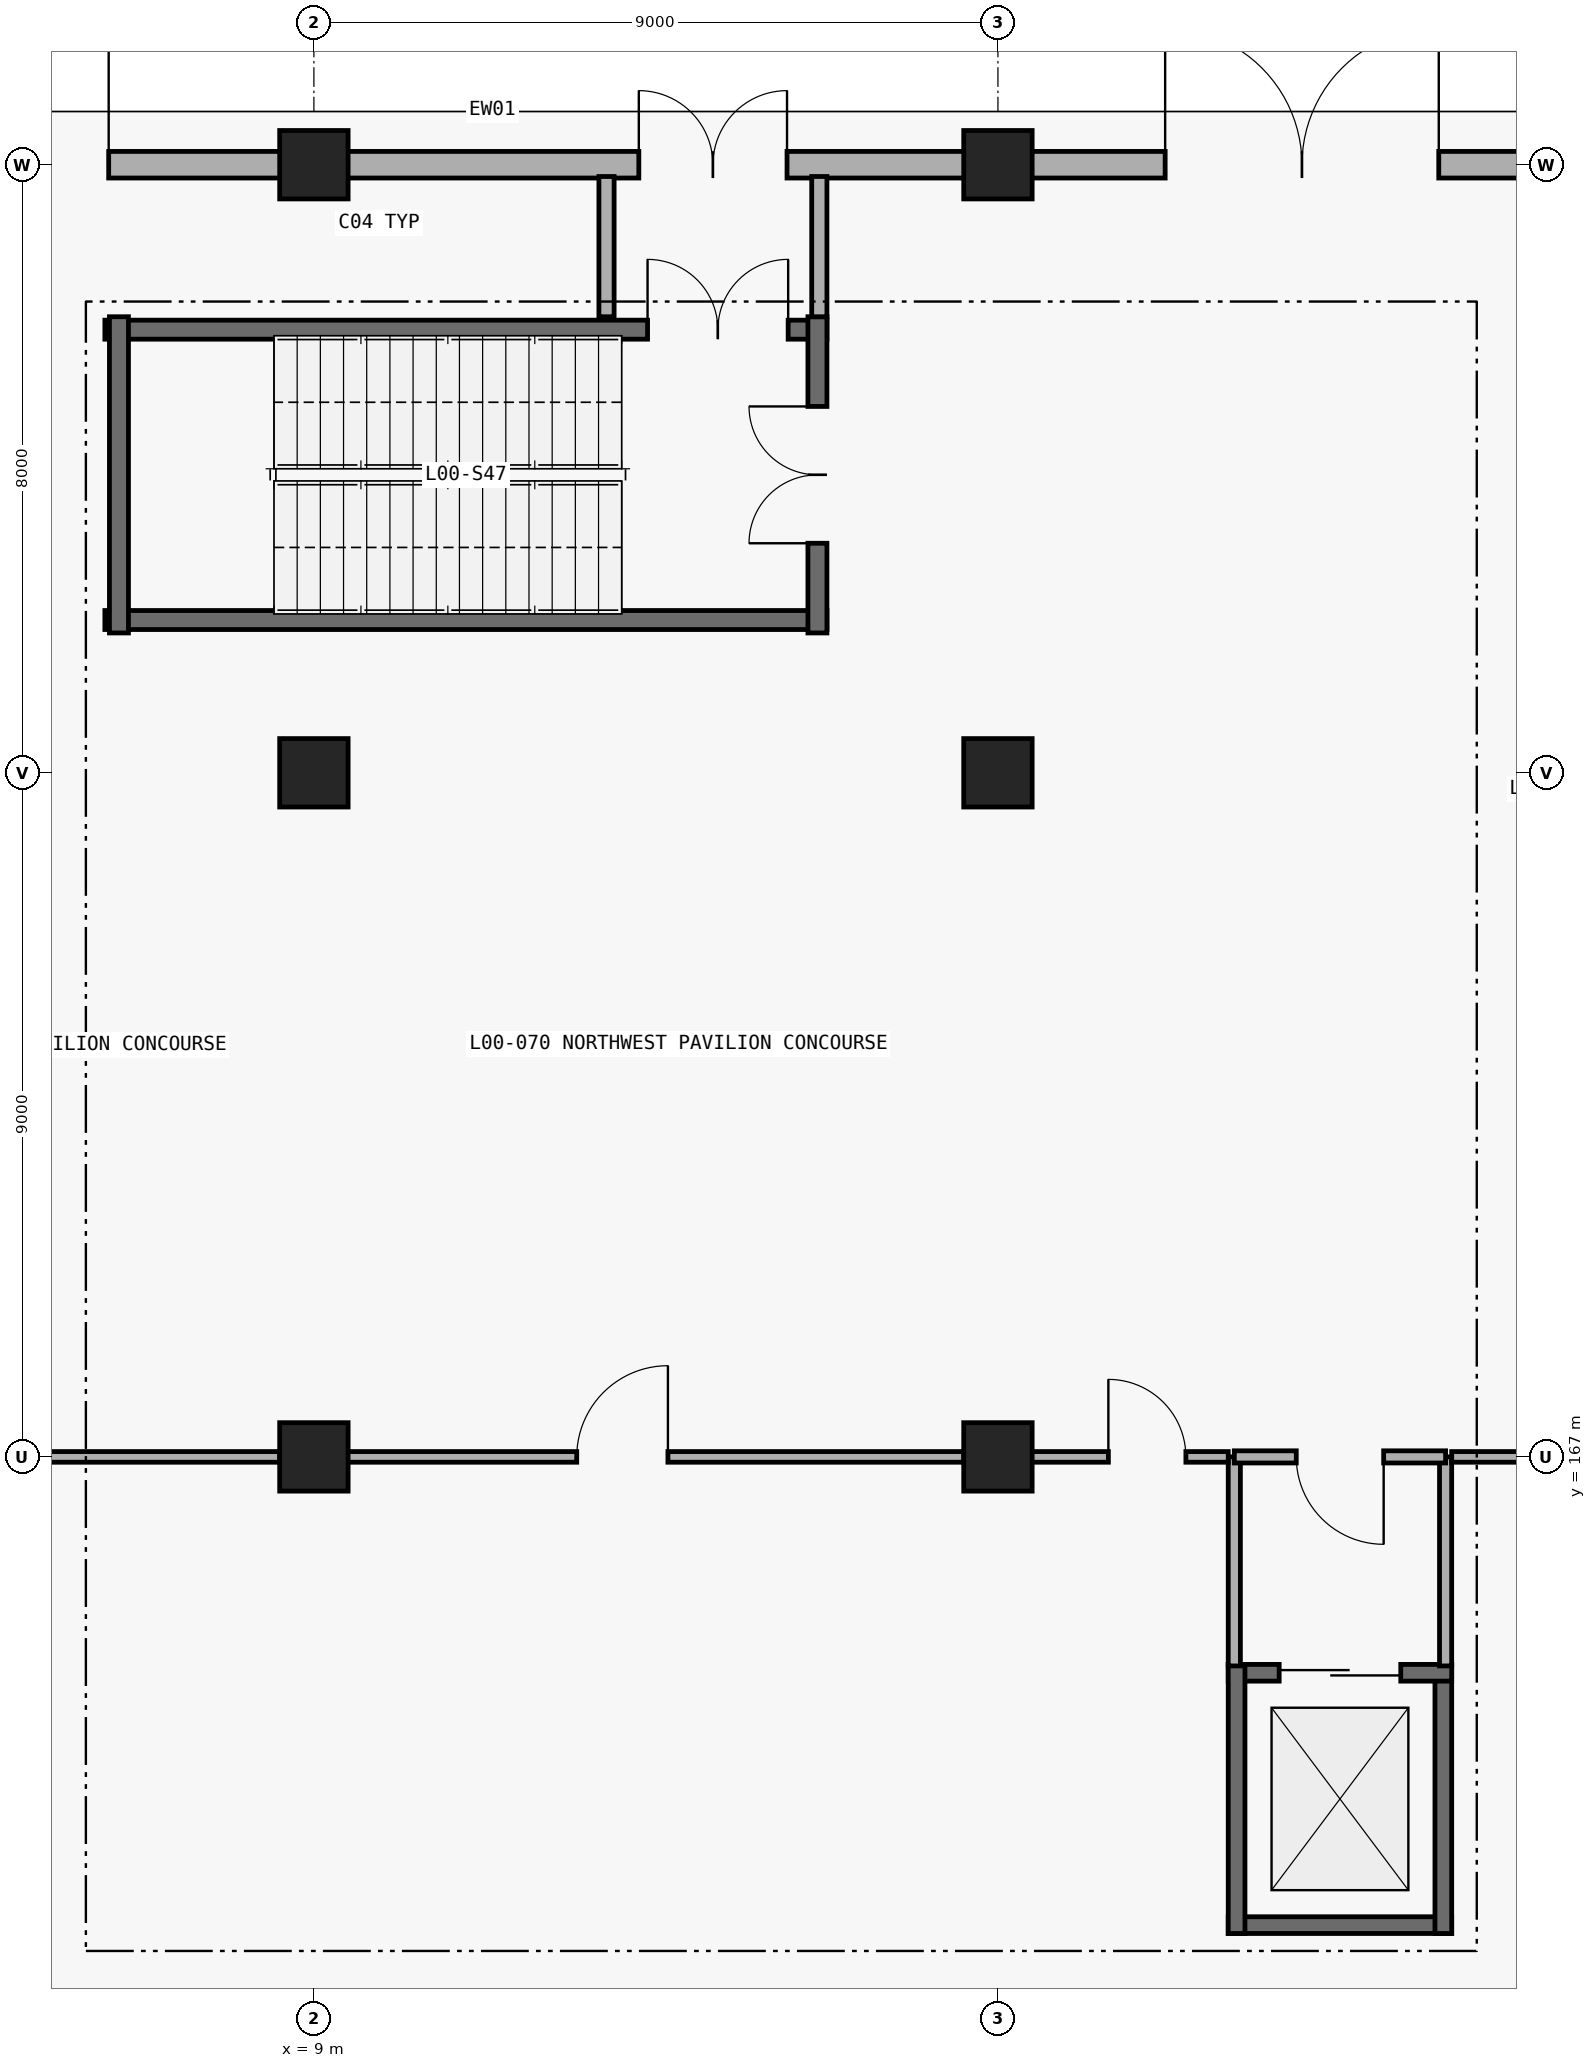
"""IFC4 building model, lengths in metres.
Left out: names, types, materials, properties, quantities, classifications, styles, units other than length and angle.
Written with IfcOpenShell. Run it as: python <this file> out.ifc"""

import sys

from ifc_helpers import new_model, si_unit, direction, frame, frame_2d, origin, origin_2d, place, context, subcontext, project, spatial, rectangle, extrude, element, fill, save


model = new_model("IFC4")
c1 = context("Model", 3, precision=1e-05, world=origin(), true_north=direction((0.0, 1.0)))
c2 = subcontext(c1, "Body", "Model", "MODEL_VIEW")
j1 = project(units=[si_unit("LENGTHUNIT", "METRE"), si_unit("PLANEANGLEUNIT", "RADIAN")], contexts=[c1])
p1 = place(None, origin())
s1 = spatial("IfcSite", under=j1, at=p1, CompositionType="ELEMENT")
p2 = place(p1, origin())
s2 = spatial("IfcBuilding", under=s1, at=p2, CompositionType="ELEMENT")
p3 = place(p2, origin())
s3 = spatial("IfcBuildingStorey", under=s2, at=p3, CompositionType="ELEMENT", Elevation=0.0)
for number, where, z_axis, x_axis in (
    (1, (9.0, 167.0, 0.0), (0.0, 0.0, 1.0), (1.0, 0.0, 0.0)),
    (2, (9.0, 176.0, 0.0), (0.0, 0.0, 1.0), (1.0, 0.0, 0.0)),
    (3, (9.0, 184.0, 0.0), (0.0, 0.0, 1.0), (1.0, 0.0, 0.0)),
    (4, (18.0, 167.0, 0.0), (0.0, 0.0, 1.0), (1.0, 0.0, 0.0)),
    (5, (18.0, 176.0, 0.0), (0.0, 0.0, 1.0), (1.0, 0.0, 0.0)),
    (6, (18.0, 184.0, 0.0), (0.0, 0.0, 1.0), (1.0, 0.0, 0.0)),
):
    element("IfcColumn", number, at=place(p3, frame(where, z_axis=z_axis, x_axis=x_axis)), inside=s3, PredefinedType="COLUMN", context=c2, shape_type="SweptSolid", body=[
        extrude(rectangle(XDim=0.9, YDim=0.9, at=origin_2d()), origin(), (0.0, 0.0, 1.0), 5.4),
    ])
p4 = place(p3, frame((0.425, 184.0, 0.0), z_axis=(0.0, 0.0, 1.0), x_axis=(1.0, 0.0, 0.0)))
e7 = element("IfcWall", 7, at=p4, inside=s3, PredefinedType="STANDARD", context=c2, shape_type="SweptSolid", body=[
    extrude(rectangle(XDim=8.15, YDim=0.35, at=frame_2d((4.075, 0.0))), origin(), (0.0, 0.0, 1.0), 4.384),
])
p5 = place(p4, frame((2.275, 0.0, 0.0)))
e8 = element("IfcOpeningElement", 8, at=p5, cuts=e7, PredefinedType="OPENING", context=c2, shape_type="SweptSolid", body=[
    extrude(rectangle(XDim=3.6, YDim=2.7, at=frame_2d((1.8, 1.35))), frame((0.0, 0.185, 0.0), z_axis=(0.0, -1.0, 0.0), x_axis=(1.0, 0.0, 0.0)), (0.0, 0.0, 1.0), 0.37),
])
p6 = place(p3, frame((9.425, 184.0, 0.0), z_axis=(0.0, 0.0, 1.0), x_axis=(1.0, 0.0, 0.0)))
e9 = element("IfcWall", 9, at=p6, inside=s3, PredefinedType="STANDARD", context=c2, shape_type="SweptSolid", body=[
    extrude(rectangle(XDim=8.15, YDim=0.35, at=frame_2d((4.075, 0.0))), origin(), (0.0, 0.0, 1.0), 4.384),
])
p7 = place(p6, frame((3.85, 0.0, 0.0)))
e10 = element("IfcOpeningElement", 10, at=p7, cuts=e9, PredefinedType="OPENING", context=c2, shape_type="SweptSolid", body=[
    extrude(rectangle(XDim=1.95, YDim=2.25, at=frame_2d((0.975, 1.125))), frame((0.0, 0.185, 0.0), z_axis=(0.0, -1.0, 0.0), x_axis=(1.0, 0.0, 0.0)), (0.0, 0.0, 1.0), 0.37),
])
p8 = place(p3, frame((18.425, 184.0, 0.0), z_axis=(0.0, 0.0, 1.0), x_axis=(1.0, 0.0, 0.0)))
e11 = element("IfcWall", 11, at=p8, inside=s3, PredefinedType="STANDARD", context=c2, shape_type="SweptSolid", body=[
    extrude(rectangle(XDim=8.15, YDim=0.35, at=frame_2d((4.075, 0.0))), origin(), (0.0, 0.0, 1.0), 4.384),
])
p9 = place(p8, frame((1.775, 0.0, 0.0)))
e12 = element("IfcOpeningElement", 12, at=p9, cuts=e11, PredefinedType="OPENING", context=c2, shape_type="SweptSolid", body=[
    extrude(rectangle(XDim=3.6, YDim=2.7, at=frame_2d((1.8, 1.35))), frame((0.0, 0.185, 0.0), z_axis=(0.0, -1.0, 0.0), x_axis=(1.0, 0.0, 0.0)), (0.0, 0.0, 1.0), 0.37),
])
p10 = place(p3, frame((6.25, 181.83, 0.0), z_axis=(0.0, 0.0, 1.0), x_axis=(1.0, 0.0, 0.0)))
e13 = element("IfcWall", 13, at=p10, inside=s3, PredefinedType="SHEAR", context=c2, shape_type="SweptSolid", body=[
    extrude(rectangle(XDim=9.5, YDim=0.25, at=frame_2d((4.75, 0.0))), origin(), (0.0, 0.0, 1.0), 5.1),
])
p11 = place(p10, frame((7.14, 0.0, 0.0)))
e14 = element("IfcOpeningElement", 14, at=p11, cuts=e13, PredefinedType="OPENING", context=c2, shape_type="SweptSolid", body=[
    extrude(rectangle(XDim=1.85, YDim=2.3, at=frame_2d((0.925, 1.15))), frame((0.0, 0.135, 0.0), z_axis=(0.0, -1.0, 0.0), x_axis=(1.0, 0.0, 0.0)), (0.0, 0.0, 1.0), 0.27),
])
p12 = place(p3, frame((6.25, 178.01, 0.0), z_axis=(0.0, 0.0, 1.0), x_axis=(1.0, 0.0, 0.0)))
e15 = element("IfcWall", 15, at=p12, inside=s3, PredefinedType="SHEAR", context=c2, shape_type="SweptSolid", body=[
    extrude(rectangle(XDim=9.5, YDim=0.25, at=frame_2d((4.75, 0.0))), origin(), (0.0, 0.0, 1.0), 5.1),
])
p13 = place(p3, frame((15.625, 177.84, 0.0), z_axis=(0.0, 0.0, 1.0), x_axis=(0.0, 1.0, 0.0)))
e16 = element("IfcWall", 16, at=p13, inside=s3, PredefinedType="SHEAR", context=c2, shape_type="SweptSolid", body=[
    extrude(rectangle(XDim=4.16, YDim=0.25, at=frame_2d((2.08, 0.0))), origin(), (0.0, 0.0, 1.0), 5.1),
])
p14 = place(p13, frame((1.18, 0.0, 0.0)))
e17 = element("IfcOpeningElement", 17, at=p14, cuts=e16, PredefinedType="OPENING", context=c2, shape_type="SweptSolid", body=[
    extrude(rectangle(XDim=1.8, YDim=2.25, at=frame_2d((0.9, 1.125))), frame((0.0, 0.135, 0.0), z_axis=(0.0, -1.0, 0.0), x_axis=(1.0, 0.0, 0.0)), (0.0, 0.0, 1.0), 0.27),
])
p15 = place(p3, frame((6.435, 182.0, 0.0), z_axis=(0.0, 0.0, 1.0), x_axis=(0.0, -1.0, 0.0)))
e18 = element("IfcWall", 18, at=p15, inside=s3, PredefinedType="SHEAR", context=c2, shape_type="SweptSolid", body=[
    extrude(rectangle(XDim=4.16, YDim=0.25, at=frame_2d((2.08, 0.0))), origin(), (0.0, 0.0, 1.0), 5.1),
])
for number, where, z_axis, x_axis in (
    (19, (15.65, 182.0, 0.0), (0.0, 0.0, 1.0), (0.0, 1.0, 0.0)),
    (20, (12.85, 182.0, 0.0), (0.0, 0.0, 1.0), (0.0, 1.0, 0.0)),
):
    element("IfcWall", number, at=place(p3, frame(where, z_axis=z_axis, x_axis=x_axis)), inside=s3, PredefinedType="PARTITIONING", context=c2, shape_type="SweptSolid", body=[
        extrude(rectangle(XDim=1.845, YDim=0.2, at=frame_2d((0.922, 0.0))), origin(), (0.0, 0.0, 1.0), 4.384),
    ])
p16 = place(p3, frame((21.03, 160.84, 0.0), z_axis=(0.0, 0.0, 1.0), x_axis=(1.0, 0.0, 0.0)))
e21 = element("IfcWall", 21, at=p16, inside=s3, PredefinedType="SHEAR", context=c2, shape_type="SweptSolid", body=[
    extrude(rectangle(XDim=2.94, YDim=0.22, at=frame_2d((1.47, 0.0))), origin(), (0.0, 0.0, 1.0), 5.1),
])
p17 = place(p3, frame((23.86, 160.73, 0.0), z_axis=(0.0, 0.0, 1.0), x_axis=(0.0, 1.0, 0.0)))
e22 = element("IfcWall", 22, at=p17, inside=s3, PredefinedType="SHEAR", context=c2, shape_type="SweptSolid", body=[
    extrude(rectangle(XDim=3.54, YDim=0.22, at=frame_2d((1.77, 0.0))), origin(), (0.0, 0.0, 1.0), 5.1),
])
p18 = place(p3, frame((23.97, 164.16, 0.0), z_axis=(0.0, 0.0, 1.0), x_axis=(-1.0, 0.0, 0.0)))
e23 = element("IfcWall", 23, at=p18, inside=s3, PredefinedType="SHEAR", context=c2, shape_type="SweptSolid", body=[
    extrude(rectangle(XDim=2.94, YDim=0.22, at=frame_2d((1.47, 0.0))), origin(), (0.0, 0.0, 1.0), 5.1),
])
p19 = place(p18, frame((0.67, 0.0, 0.0)))
e24 = element("IfcOpeningElement", 24, at=p19, cuts=e23, PredefinedType="OPENING", context=c2, shape_type="SweptSolid", body=[
    extrude(rectangle(XDim=1.6, YDim=2.3, at=frame_2d((0.8, 1.15))), frame((0.0, 0.12, 0.0), z_axis=(0.0, -1.0, 0.0), x_axis=(1.0, 0.0, 0.0)), (0.0, 0.0, 1.0), 0.24),
])
p20 = place(p3, frame((21.14, 164.27, 0.0), z_axis=(0.0, 0.0, 1.0), x_axis=(0.0, -1.0, 0.0)))
e25 = element("IfcWall", 25, at=p20, inside=s3, PredefinedType="SHEAR", context=c2, shape_type="SweptSolid", body=[
    extrude(rectangle(XDim=3.54, YDim=0.22, at=frame_2d((1.77, 0.0))), origin(), (0.0, 0.0, 1.0), 5.1),
])
for number, where, z_axis, x_axis in (
    (26, (23.89, 164.25, 0.0), (0.0, 0.0, 1.0), (0.0, 1.0, 0.0)),
    (27, (21.11, 164.25, 0.0), (0.0, 0.0, 1.0), (0.0, 1.0, 0.0)),
):
    element("IfcWall", number, at=place(p3, frame(where, z_axis=z_axis, x_axis=x_axis)), inside=s3, PredefinedType="PARTITIONING", context=c2, shape_type="SweptSolid", body=[
        extrude(rectangle(XDim=2.75, YDim=0.16, at=frame_2d((1.375, 0.0))), origin(), (0.0, 0.0, 1.0), 4.384),
    ])
p21 = place(p3, frame((23.89, 167.0, 0.0), z_axis=(0.0, 0.0, 1.0), x_axis=(-1.0, 0.0, 0.0)))
e28 = element("IfcWall", 28, at=p21, inside=s3, PredefinedType="PARTITIONING", context=c2, shape_type="SweptSolid", body=[
    extrude(rectangle(XDim=2.78, YDim=0.16, at=frame_2d((1.39, 0.0))), origin(), (0.0, 0.0, 1.0), 4.384),
])
p22 = place(p21, frame((0.815, 0.0, 0.0)))
e29 = element("IfcOpeningElement", 29, at=p22, cuts=e28, PredefinedType="OPENING", context=c2, shape_type="SweptSolid", body=[
    extrude(rectangle(XDim=1.15, YDim=2.2, at=frame_2d((0.575, 1.1))), frame((0.0, 0.09, 0.0), z_axis=(0.0, -1.0, 0.0), x_axis=(1.0, 0.0, 0.0)), (0.0, 0.0, 1.0), 0.18),
])
p23 = place(p3, frame((0.435, 167.0, 0.0), z_axis=(0.0, 0.0, 1.0), x_axis=(1.0, 0.0, 0.0)))
e30 = element("IfcWall", 30, at=p23, inside=s3, PredefinedType="PARTITIONING", context=c2, shape_type="SweptSolid", body=[
    extrude(rectangle(XDim=8.13, YDim=0.14, at=frame_2d((4.065, 0.0))), origin(), (0.0, 0.0, 1.0), 4.384),
])
p24 = place(p23, frame((3.515, 0.0, 0.0)))
e31 = element("IfcOpeningElement", 31, at=p24, cuts=e30, PredefinedType="OPENING", context=c2, shape_type="SweptSolid", body=[
    extrude(rectangle(XDim=1.1, YDim=2.15, at=frame_2d((0.55, 1.075))), frame((0.0, 0.08, 0.0), z_axis=(0.0, -1.0, 0.0), x_axis=(1.0, 0.0, 0.0)), (0.0, 0.0, 1.0), 0.16),
])
p25 = place(p3, frame((8.55, 167.0, 0.0), z_axis=(0.0, 0.0, 1.0), x_axis=(1.0, 0.0, 0.0)))
e32 = element("IfcWall", 32, at=p25, inside=s3, PredefinedType="PARTITIONING", context=c2, shape_type="SweptSolid", body=[
    extrude(rectangle(XDim=9.015, YDim=0.14, at=frame_2d((4.507, 0.0))), origin(), (0.0, 0.0, 1.0), 4.384),
])
p26 = place(p25, frame((3.908, 0.0, 0.0)))
e33 = element("IfcOpeningElement", 33, at=p26, cuts=e32, PredefinedType="OPENING", context=c2, shape_type="SweptSolid", body=[
    extrude(rectangle(XDim=1.2, YDim=2.25, at=frame_2d((0.6, 1.125))), frame((0.0, 0.08, 0.0), z_axis=(0.0, -1.0, 0.0), x_axis=(1.0, 0.0, 0.0)), (0.0, 0.0, 1.0), 0.16),
])
p27 = place(p3, frame((17.55, 167.0, 0.0), z_axis=(0.0, 0.0, 1.0), x_axis=(1.0, 0.0, 0.0)))
e34 = element("IfcWall", 34, at=p27, inside=s3, PredefinedType="PARTITIONING", context=c2, shape_type="SweptSolid", body=[
    extrude(rectangle(XDim=3.48, YDim=0.14, at=frame_2d((1.74, 0.0))), origin(), (0.0, 0.0, 1.0), 4.384),
])
p28 = place(p27, frame((1.903, 0.0, 0.0)))
e35 = element("IfcOpeningElement", 35, at=p28, cuts=e34, PredefinedType="OPENING", context=c2, shape_type="SweptSolid", body=[
    extrude(rectangle(XDim=1.02, YDim=2.2, at=frame_2d((0.51, 1.1))), frame((0.0, 0.08, 0.0), z_axis=(0.0, -1.0, 0.0), x_axis=(1.0, 0.0, 0.0)), (0.0, 0.0, 1.0), 0.16),
])
p29 = place(p3, frame((23.97, 167.0, 0.0), z_axis=(0.0, 0.0, 1.0), x_axis=(1.0, 0.0, 0.0)))
e36 = element("IfcWall", 36, at=p29, inside=s3, PredefinedType="PARTITIONING", context=c2, shape_type="SweptSolid", body=[
    extrude(rectangle(XDim=2.595, YDim=0.14, at=frame_2d((1.297, 0.0))), origin(), (0.0, 0.0, 1.0), 4.384),
])
p30 = place(p5, origin())
e37 = element("IfcDoor", 37, at=p30, inside=s3, OperationType="DOUBLE_DOOR_SINGLE_SWING", PredefinedType="DOOR", context=c2, shape_type="SweptSolid", body=[
    extrude(rectangle(XDim=3.6, YDim=2.7, at=frame_2d((1.8, 1.35))), frame((0.0, 0.025, 0.0), z_axis=(0.0, -1.0, 0.0), x_axis=(1.0, 0.0, 0.0)), (0.0, 0.0, 1.0), 0.05),
])
fill(e8, e37)
p31 = place(p7, origin())
e38 = element("IfcDoor", 38, at=p31, inside=s3, OperationType="DOUBLE_DOOR_SINGLE_SWING", PredefinedType="DOOR", context=c2, shape_type="SweptSolid", body=[
    extrude(rectangle(XDim=1.95, YDim=2.25, at=frame_2d((0.975, 1.125))), frame((0.0, 0.025, 0.0), z_axis=(0.0, -1.0, 0.0), x_axis=(1.0, 0.0, 0.0)), (0.0, 0.0, 1.0), 0.05),
])
fill(e10, e38)
p32 = place(p9, origin())
e39 = element("IfcDoor", 39, at=p32, inside=s3, OperationType="DOUBLE_DOOR_SINGLE_SWING", PredefinedType="DOOR", context=c2, shape_type="SweptSolid", body=[
    extrude(rectangle(XDim=3.6, YDim=2.7, at=frame_2d((1.8, 1.35))), frame((0.0, 0.025, 0.0), z_axis=(0.0, -1.0, 0.0), x_axis=(1.0, 0.0, 0.0)), (0.0, 0.0, 1.0), 0.05),
])
fill(e12, e39)
p33 = place(p14, origin())
e40 = element("IfcDoor", 40, at=p33, inside=s3, OperationType="DOUBLE_DOOR_SINGLE_SWING", PredefinedType="DOOR", context=c2, shape_type="SweptSolid", body=[
    extrude(rectangle(XDim=1.8, YDim=2.25, at=frame_2d((0.9, 1.125))), frame((0.0, 0.025, 0.0), z_axis=(0.0, -1.0, 0.0), x_axis=(1.0, 0.0, 0.0)), (0.0, 0.0, 1.0), 0.05),
])
fill(e17, e40)
p34 = place(p11, origin())
e41 = element("IfcDoor", 41, at=p34, inside=s3, OperationType="DOUBLE_DOOR_SINGLE_SWING", PredefinedType="DOOR", context=c2, shape_type="SweptSolid", body=[
    extrude(rectangle(XDim=1.85, YDim=2.3, at=frame_2d((0.925, 1.15))), frame((0.0, 0.025, 0.0), z_axis=(0.0, -1.0, 0.0), x_axis=(1.0, 0.0, 0.0)), (0.0, 0.0, 1.0), 0.05),
])
fill(e14, e41)
p35 = place(p19, origin())
e42 = element("IfcDoor", 42, at=p35, inside=s3, OperationType="SLIDING_TO_LEFT", PredefinedType="DOOR", context=c2, shape_type="SweptSolid", body=[
    extrude(rectangle(XDim=1.6, YDim=2.3, at=frame_2d((0.8, 1.15))), frame((0.0, 0.025, 0.0), z_axis=(0.0, -1.0, 0.0), x_axis=(1.0, 0.0, 0.0)), (0.0, 0.0, 1.0), 0.05),
])
fill(e24, e42)
p36 = place(p22, origin())
e43 = element("IfcDoor", 43, at=p36, inside=s3, OperationType="SINGLE_SWING_LEFT", PredefinedType="DOOR", context=c2, shape_type="SweptSolid", body=[
    extrude(rectangle(XDim=1.15, YDim=2.2, at=frame_2d((0.575, 1.1))), frame((0.0, 0.025, 0.0), z_axis=(0.0, -1.0, 0.0), x_axis=(1.0, 0.0, 0.0)), (0.0, 0.0, 1.0), 0.05),
])
fill(e29, e43)
p37 = place(p26, origin())
e44 = element("IfcDoor", 44, at=p37, inside=s3, OperationType="SINGLE_SWING_RIGHT", PredefinedType="DOOR", context=c2, shape_type="SweptSolid", body=[
    extrude(rectangle(XDim=1.2, YDim=2.25, at=frame_2d((0.6, 1.125))), frame((0.0, 0.025, 0.0), z_axis=(0.0, -1.0, 0.0), x_axis=(1.0, 0.0, 0.0)), (0.0, 0.0, 1.0), 0.05),
])
fill(e33, e44)
p38 = place(p28, origin())
e45 = element("IfcDoor", 45, at=p38, inside=s3, OperationType="SINGLE_SWING_LEFT", PredefinedType="DOOR", context=c2, shape_type="SweptSolid", body=[
    extrude(rectangle(XDim=1.02, YDim=2.2, at=frame_2d((0.51, 1.1))), frame((0.0, 0.025, 0.0), z_axis=(0.0, -1.0, 0.0), x_axis=(1.0, 0.0, 0.0)), (0.0, 0.0, 1.0), 0.05),
])
fill(e35, e45)
save(model, sys.argv[1])
